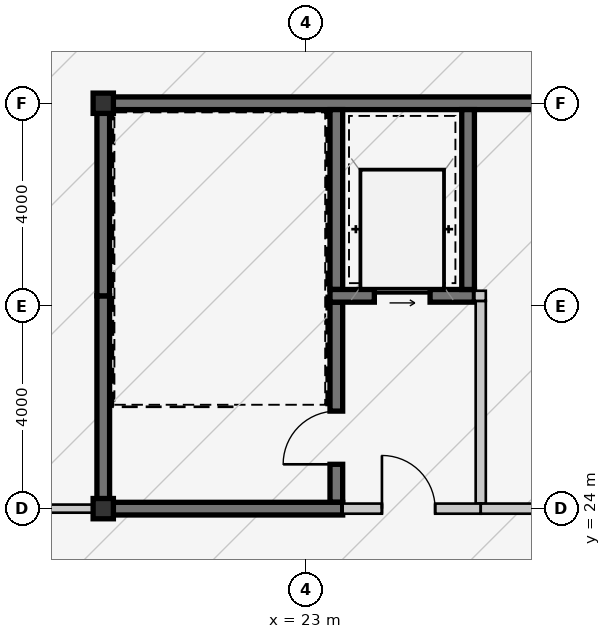
"""IFC4 building model, lengths in metres.
Left out: names, types, materials, properties, quantities, classifications, styles, units other than length and angle.
Written with IfcOpenShell. Run it as: python <this file> out.ifc"""

import sys

from ifc_helpers import new_model, si_unit, direction, frame, frame_2d, origin, origin_2d, place, context, subcontext, project, spatial, rectangle, hollow_rectangle, extrude, source, transform, mapped, element, fill, save


model = new_model("IFC4")
c1 = context("Model", 3, precision=1e-05, world=origin(), true_north=direction((0.0, 1.0)))
c2 = subcontext(c1, "Body", "Model", "MODEL_VIEW")
j1 = project(units=[si_unit("LENGTHUNIT", "METRE"), si_unit("PLANEANGLEUNIT", "RADIAN")], contexts=[c1])
p1 = place(None, origin())
s1 = spatial("IfcSite", under=j1, at=p1, CompositionType="ELEMENT")
p2 = place(p1, origin())
s2 = spatial("IfcBuilding", under=s1, at=p2, CompositionType="ELEMENT")
p3 = place(p2, frame((0.0, 0.0, 253.05)))
s3 = spatial("IfcBuildingStorey", under=s2, at=p3, CompositionType="ELEMENT", Elevation=253.05)
m1 = source(origin(), c2, "Body", "SweptSolid", [
    extrude(hollow_rectangle(XDim=0.4, YDim=0.4, WallThickness=0.016, at=origin_2d()), origin(), (0.0, 0.0, 1.0), 15.375),
])
p4 = place(p3, frame((19.0, 24.0, 0.0), z_axis=(0.0, 0.0, 1.0), x_axis=(1.0, 0.0, 0.0)))
e1 = element("IfcColumn", 1, at=p4, inside=s3, PredefinedType="COLUMN", context=c2, shape_type="MappedRepresentation", body=[
    mapped(m1, transform((0.0, 0.0, 0.0), scale=1.0)),
])
m2 = source(origin(), c2, "Body", "SweptSolid", [
    extrude(hollow_rectangle(XDim=0.4, YDim=0.4, WallThickness=0.016, at=origin_2d()), origin(), (0.0, 0.0, 1.0), 15.543),
])
p5 = place(p3, frame((19.0, 32.0, 0.0), z_axis=(0.0, 0.0, 1.0), x_axis=(1.0, 0.0, 0.0)))
e2 = element("IfcColumn", 2, at=p5, inside=s3, PredefinedType="COLUMN", context=c2, shape_type="MappedRepresentation", body=[
    mapped(m2, transform((0.0, 0.0, 0.0), scale=1.0)),
])
m3 = source(origin(), c2, "Body", "SweptSolid", [
    extrude(rectangle(XDim=9.125, YDim=0.25, at=frame_2d((4.562, 0.0))), origin(), (0.0, 0.0, 1.0), 4.3),
])
p6 = place(p3, frame((18.875, 32.0, 0.0), z_axis=(0.0, 0.0, 1.0), x_axis=(1.0, 0.0, 0.0)))
e3 = element("IfcWall", 3, at=p6, inside=s3, PredefinedType="SHEAR", context=c2, shape_type="MappedRepresentation", body=[
    mapped(m3, transform((0.0, 0.0, 0.0), scale=1.0)),
])
m4 = source(origin(), c2, "Body", "SweptSolid", [
    extrude(rectangle(XDim=4.075, YDim=0.25, at=frame_2d((2.038, 0.0))), origin(), (0.0, 0.0, 1.0), 4.3),
])
p7 = place(p3, frame((19.0, 24.125, 0.0), z_axis=(0.0, 0.0, 1.0), x_axis=(0.0, 1.0, 0.0)))
e4 = element("IfcWall", 4, at=p7, inside=s3, PredefinedType="SHEAR", context=c2, shape_type="MappedRepresentation", body=[
    mapped(m4, transform((0.0, 0.0, 0.0), scale=1.0)),
])
m5 = source(origin(), c2, "Body", "SweptSolid", [
    extrude(rectangle(XDim=3.675, YDim=0.25, at=frame_2d((1.837, 0.0))), origin(), (0.0, 0.0, 1.0), 4.3),
])
p8 = place(p3, frame((19.0, 28.2, 0.0), z_axis=(0.0, 0.0, 1.0), x_axis=(0.0, 1.0, 0.0)))
e5 = element("IfcWall", 5, at=p8, inside=s3, PredefinedType="SHEAR", context=c2, shape_type="MappedRepresentation", body=[
    mapped(m5, transform((0.0, 0.0, 0.0), scale=1.0)),
])
m6 = source(origin(), c2, "Body", "SweptSolid", [
    extrude(rectangle(XDim=3.55, YDim=0.25, at=frame_2d((1.775, 0.0))), origin(), (0.0, 0.0, 1.0), 4.3),
])
p9 = place(p3, frame((23.6, 28.325, 0.0), z_axis=(0.0, 0.0, 1.0), x_axis=(0.0, 1.0, 0.0)))
e6 = element("IfcWall", 6, at=p9, inside=s3, PredefinedType="SHEAR", context=c2, shape_type="MappedRepresentation", body=[
    mapped(m6, transform((0.0, 0.0, 0.0), scale=1.0)),
])
m7 = source(origin(), c2, "Body", "SweptSolid", [
    extrude(rectangle(XDim=3.95, YDim=0.25, at=frame_2d((1.975, 0.0))), origin(), (0.0, 0.0, 1.0), 4.3),
])
p10 = place(p3, frame((23.6, 24.125, 0.0), z_axis=(0.0, 0.0, 1.0), x_axis=(0.0, 1.0, 0.0)))
e7 = element("IfcWall", 7, at=p10, inside=s3, PredefinedType="SHEAR", context=c2, shape_type="MappedRepresentation", body=[
    mapped(m7, transform((0.0, 0.0, 0.0), scale=1.0)),
])
m8 = source(origin(), c2, "Body", "SweptSolid", [
    extrude(rectangle(XDim=1.05, YDim=2.1, at=frame_2d((0.525, 1.05))), frame((0.0, 0.135, 0.0), z_axis=(0.0, -1.0, 0.0), x_axis=(1.0, 0.0, 0.0)), (0.0, 0.0, 1.0), 0.27),
])
p11 = place(p10, frame((0.75, 0.0, 0.0)))
e8 = element("IfcOpeningElement", 8, at=p11, cuts=e7, PredefinedType="OPENING", context=c2, shape_type="MappedRepresentation", body=[
    mapped(m8, transform((0.0, 0.0, 0.0), scale=1.0)),
])
m9 = source(origin(), c2, "Body", "SweptSolid", [
    extrude(rectangle(XDim=4.85, YDim=0.25, at=frame_2d((2.425, 0.0))), origin(), (0.0, 0.0, 1.0), 4.3),
])
p12 = place(p3, frame((18.875, 24.0, 0.0), z_axis=(0.0, 0.0, 1.0), x_axis=(1.0, 0.0, 0.0)))
e9 = element("IfcWall", 9, at=p12, inside=s3, PredefinedType="SHEAR", context=c2, shape_type="MappedRepresentation", body=[
    mapped(m9, transform((0.0, 0.0, 0.0), scale=1.0)),
])
m10 = source(origin(), c2, "Body", "SweptSolid", [
    extrude(rectangle(XDim=2.85, YDim=0.25, at=frame_2d((1.425, 0.0))), origin(), (0.0, 0.0, 1.0), 4.3),
])
p13 = place(p3, frame((23.475, 28.2, 0.0), z_axis=(0.0, 0.0, 1.0), x_axis=(1.0, 0.0, 0.0)))
e10 = element("IfcWall", 10, at=p13, inside=s3, PredefinedType="SHEAR", context=c2, shape_type="MappedRepresentation", body=[
    mapped(m10, transform((0.0, 0.0, 0.0), scale=1.0)),
])
m11 = source(origin(), c2, "Body", "SweptSolid", [
    extrude(rectangle(XDim=1.1, YDim=2.15, at=frame_2d((0.55, 1.075))), frame((0.0, 0.135, 0.0), z_axis=(0.0, -1.0, 0.0), x_axis=(1.0, 0.0, 0.0)), (0.0, 0.0, 1.0), 0.27),
])
p14 = place(p13, frame((0.875, 0.0, 0.0)))
e11 = element("IfcOpeningElement", 11, at=p14, cuts=e10, PredefinedType="OPENING", context=c2, shape_type="MappedRepresentation", body=[
    mapped(m11, transform((0.0, 0.0, 0.0), scale=1.0)),
])
p15 = place(p3, frame((26.2, 28.325, 0.0), z_axis=(0.0, 0.0, 1.0), x_axis=(0.0, 1.0, 0.0)))
e12 = element("IfcWall", 12, at=p15, inside=s3, PredefinedType="SHEAR", context=c2, shape_type="MappedRepresentation", body=[
    mapped(m6, transform((0.0, 0.0, 0.0), scale=1.0)),
])
m12 = source(origin(), c2, "Body", "SweptSolid", [
    extrude(rectangle(XDim=4.0, YDim=0.2, at=frame_2d((2.0, 0.0))), origin(), (0.0, 0.0, 1.0), 4.3),
])
p16 = place(p3, frame((26.45, 24.1, 0.0), z_axis=(0.0, 0.0, 1.0), x_axis=(0.0, 1.0, 0.0)))
e13 = element("IfcWall", 13, at=p16, inside=s3, PredefinedType="SOLIDWALL", context=c2, shape_type="MappedRepresentation", body=[
    mapped(m12, transform((0.0, 0.0, 0.0), scale=1.0)),
])
m13 = source(origin(), c2, "Body", "SweptSolid", [
    extrude(rectangle(XDim=2.725, YDim=0.2, at=frame_2d((1.362, 0.0))), origin(), (0.0, 0.0, 1.0), 4.3),
])
p17 = place(p3, frame((23.725, 24.0, 0.0), z_axis=(0.0, 0.0, 1.0), x_axis=(1.0, 0.0, 0.0)))
e14 = element("IfcWall", 14, at=p17, inside=s3, PredefinedType="SOLIDWALL", context=c2, shape_type="MappedRepresentation", body=[
    mapped(m13, transform((0.0, 0.0, 0.0), scale=1.0)),
])
m14 = source(origin(), c2, "Body", "SweptSolid", [
    extrude(rectangle(XDim=1.05, YDim=2.1, at=frame_2d((0.525, 1.05))), frame((0.0, 0.11, 0.0), z_axis=(0.0, -1.0, 0.0), x_axis=(1.0, 0.0, 0.0)), (0.0, 0.0, 1.0), 0.22),
])
p18 = place(p17, frame((0.775, 0.0, 0.0)))
e15 = element("IfcOpeningElement", 15, at=p18, cuts=e14, PredefinedType="OPENING", context=c2, shape_type="MappedRepresentation", body=[
    mapped(m14, transform((0.0, 0.0, 0.0), scale=1.0)),
])
m15 = source(origin(), c2, "Body", "SweptSolid", [
    extrude(rectangle(XDim=4.75, YDim=0.2, at=frame_2d((2.375, 0.0))), origin(), (0.0, 0.0, 1.0), 4.3),
])
p19 = place(p3, frame((31.2, 24.0, 0.0), z_axis=(0.0, 0.0, 1.0), x_axis=(-1.0, 0.0, 0.0)))
e16 = element("IfcWall", 16, at=p19, inside=s3, PredefinedType="SOLIDWALL", context=c2, shape_type="MappedRepresentation", body=[
    mapped(m15, transform((0.0, 0.0, 0.0), scale=1.0)),
])
p20 = place(p19, frame((1.3, 0.0, 0.0)))
e17 = element("IfcOpeningElement", 17, at=p20, cuts=e16, PredefinedType="OPENING", context=c2, shape_type="MappedRepresentation", body=[
    mapped(m14, transform((0.0, 0.0, 0.0), scale=1.0)),
])
m16 = source(origin(), c2, "Body", "SweptSolid", [
    extrude(rectangle(XDim=6.032, YDim=0.16, at=frame_2d((3.016, 0.0))), origin(), (0.0, 0.0, 1.0), 4.3),
])
p21 = place(p3, frame((12.843, 24.0, 0.0), z_axis=(0.0, 0.0, 1.0), x_axis=(1.0, 0.0, 0.0)))
e18 = element("IfcWall", 18, at=p21, inside=s3, PredefinedType="PARTITIONING", context=c2, shape_type="MappedRepresentation", body=[
    mapped(m16, transform((0.0, 0.0, 0.0), scale=1.0)),
])
m17 = source(origin(), c2, "Body", "SweptSolid", [
    extrude(rectangle(XDim=1.05, YDim=2.1, at=frame_2d((0.525, 1.05))), frame((0.0, 0.09, 0.0), z_axis=(0.0, -1.0, 0.0), x_axis=(1.0, 0.0, 0.0)), (0.0, 0.0, 1.0), 0.18),
])
p22 = place(p21, frame((2.543, 0.0, 0.0)))
e19 = element("IfcOpeningElement", 19, at=p22, cuts=e18, PredefinedType="OPENING", context=c2, shape_type="MappedRepresentation", body=[
    mapped(m17, transform((0.0, 0.0, 0.0), scale=1.0)),
])
m18 = source(origin(), c2, "Body", "SweptSolid", [
    extrude(rectangle(XDim=0.225, YDim=0.2, at=frame_2d((0.113, 0.0))), origin(), (0.0, 0.0, 1.0), 4.3),
])
p23 = place(p3, frame((26.325, 28.2, 0.0), z_axis=(0.0, 0.0, 1.0), x_axis=(1.0, 0.0, 0.0)))
e20 = element("IfcWall", 20, at=p23, inside=s3, PredefinedType="SOLIDWALL", context=c2, shape_type="MappedRepresentation", body=[
    mapped(m18, transform((0.0, 0.0, 0.0), scale=1.0)),
])
m19 = source(origin(), c2, "Body", "SweptSolid", [
    extrude(rectangle(XDim=1.05, YDim=2.1, at=frame_2d((0.525, 1.05))), frame((0.0, 0.025, 0.0), z_axis=(0.0, -1.0, 0.0), x_axis=(1.0, 0.0, 0.0)), (0.0, 0.0, 1.0), 0.05),
])
p24 = place(p11, origin())
e21 = element("IfcDoor", 21, at=p24, inside=s3, OperationType="SINGLE_SWING_LEFT", PredefinedType="DOOR", context=c2, shape_type="MappedRepresentation", body=[
    mapped(m19, transform((0.0, 0.0, 0.0), scale=1.0)),
])
fill(e8, e21)
m20 = source(origin(), c2, "Body", "SweptSolid", [
    extrude(rectangle(XDim=1.1, YDim=2.15, at=frame_2d((0.55, 1.075))), frame((0.0, 0.025, 0.0), z_axis=(0.0, -1.0, 0.0), x_axis=(1.0, 0.0, 0.0)), (0.0, 0.0, 1.0), 0.05),
])
p25 = place(p14, origin())
e22 = element("IfcDoor", 22, at=p25, inside=s3, OperationType="SLIDING_TO_LEFT", PredefinedType="DOOR", context=c2, shape_type="MappedRepresentation", body=[
    mapped(m20, transform((0.0, 0.0, 0.0), scale=1.0)),
])
fill(e11, e22)
p26 = place(p18, origin())
e23 = element("IfcDoor", 23, at=p26, inside=s3, OperationType="SINGLE_SWING_LEFT", PredefinedType="DOOR", context=c2, shape_type="MappedRepresentation", body=[
    mapped(m19, transform((0.0, 0.0, 0.0), scale=1.0)),
])
fill(e15, e23)
save(model, sys.argv[1])
